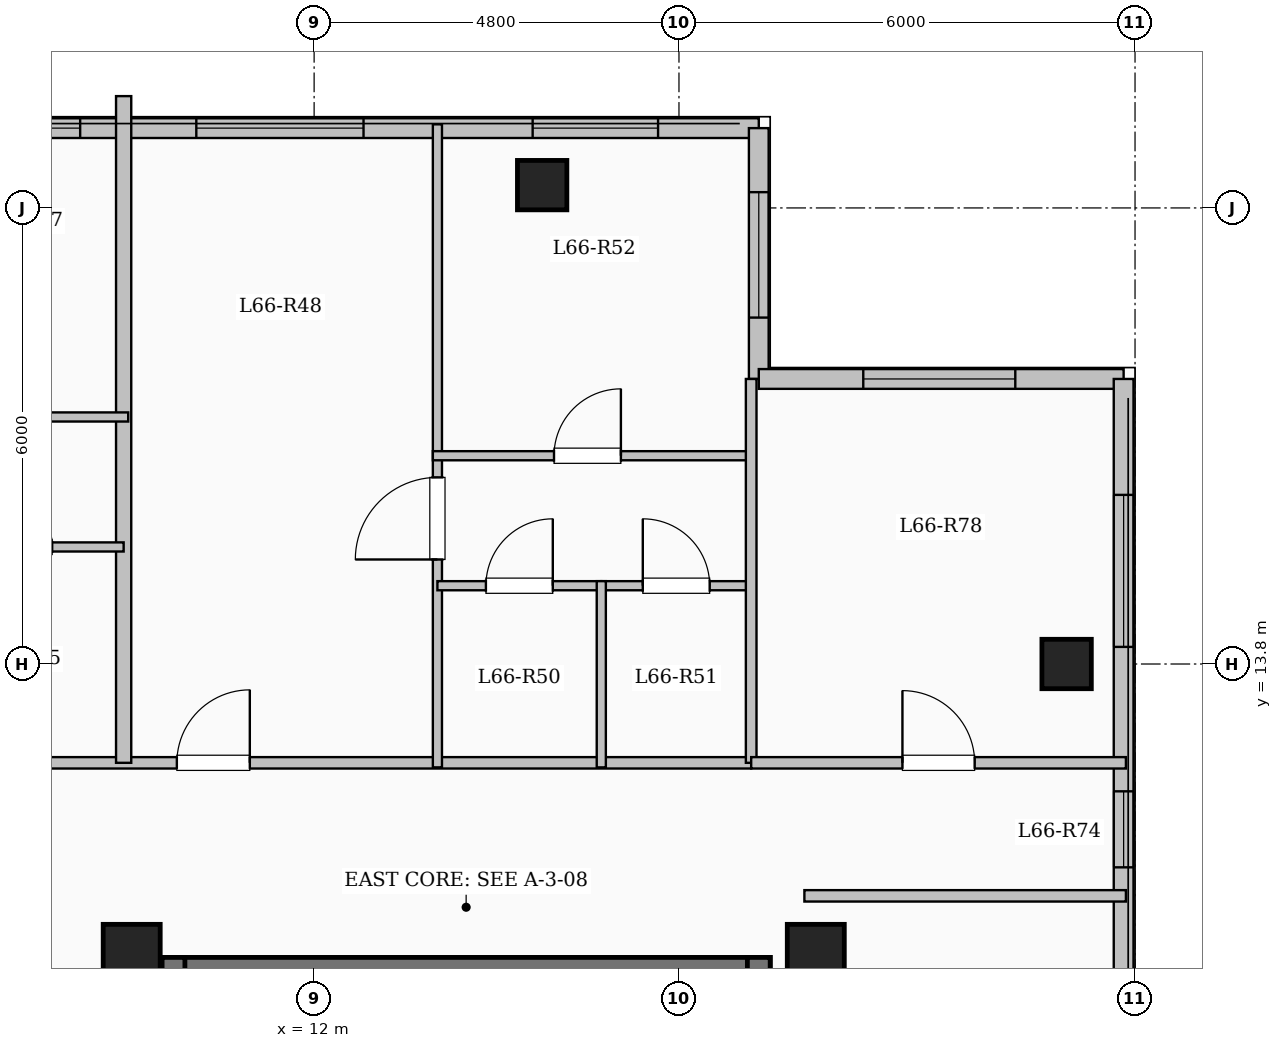
"""IFC4 building model, lengths in metres.
Left out: names, types, materials, properties, quantities, classifications, styles, units other than length and angle.
Written with IfcOpenShell. Run it as: python <this file> out.ifc"""

import sys

from ifc_helpers import new_model, si_unit, direction, frame, frame_2d, origin, origin_2d, place, context, subcontext, project, spatial, rectangle, extrude, element, fill, save


model = new_model("IFC4")
c1 = context("Model", 3, precision=1e-05, world=origin(), true_north=direction((0.0, 1.0)))
c2 = subcontext(c1, "Body", "Model", "MODEL_VIEW")
j1 = project(units=[si_unit("LENGTHUNIT", "METRE"), si_unit("PLANEANGLEUNIT", "RADIAN")], contexts=[c1])
p1 = place(None, origin())
s1 = spatial("IfcSite", under=j1, at=p1, CompositionType="ELEMENT")
p2 = place(p1, origin())
s2 = spatial("IfcBuilding", under=s1, at=p2, CompositionType="ELEMENT")
p3 = place(p2, frame((0.0, 0.0, 244.85)))
s3 = spatial("IfcBuildingStorey", under=s2, at=p3, CompositionType="ELEMENT", Elevation=244.85)
for number, where, z_axis, x_axis in (
    (1, (9.6, 10.0, 0.0), (0.0, 0.0, 1.0), (1.0, 0.0, 0.0)),
    (2, (18.6, 10.0, 0.0), (0.0, 0.0, 1.0), (1.0, 0.0, 0.0)),
):
    element("IfcColumn", number, at=place(p3, frame(where, z_axis=z_axis, x_axis=x_axis)), inside=s3, PredefinedType="COLUMN", context=c2, shape_type="SweptSolid", body=[
        extrude(rectangle(XDim=0.75, YDim=0.75, at=origin_2d()), origin(), (0.0, 0.0, 1.0), 3.35),
    ])
for number, where, z_axis, x_axis in (
    (3, (15.0, 20.1, 0.0), (0.0, 0.0, 1.0), (1.0, 0.0, 0.0)),
    (4, (21.9, 13.8, 0.0), (0.0, 0.0, 1.0), (1.0, 0.0, 0.0)),
):
    element("IfcColumn", number, at=place(p3, frame(where, z_axis=z_axis, x_axis=x_axis)), inside=s3, PredefinedType="COLUMN", context=c2, shape_type="SweptSolid", body=[
        extrude(rectangle(XDim=0.65, YDim=0.65, at=origin_2d()), origin(), (0.0, 0.0, 1.0), 3.35),
    ])
p4 = place(p3, frame((7.35, 20.85, 0.0), z_axis=(0.0, 0.0, 1.0), x_axis=(1.0, 0.0, 0.0)))
e5 = element("IfcWall", 5, at=p4, inside=s3, PredefinedType="SOLIDWALL", context=c2, shape_type="SweptSolid", body=[
    extrude(rectangle(XDim=10.5, YDim=0.26, at=frame_2d((5.25, 0.0))), origin(), (0.0, 0.0, 1.0), 3.1),
])
p5 = place(p4, frame((0.372, 0.0, 0.95)))
e6 = element("IfcOpeningElement", 6, at=p5, cuts=e5, PredefinedType="OPENING", context=c2, shape_type="SweptSolid", body=[
    extrude(rectangle(XDim=1.2, YDim=1.5, at=frame_2d((0.6, 0.75))), frame((0.0, 0.14, 0.0), z_axis=(0.0, -1.0, 0.0), x_axis=(1.0, 0.0, 0.0)), (0.0, 0.0, 1.0), 0.28),
])
p6 = place(p4, frame((3.1, 0.0, 0.9)))
e7 = element("IfcOpeningElement", 7, at=p6, cuts=e5, PredefinedType="OPENING", context=c2, shape_type="SweptSolid", body=[
    extrude(rectangle(XDim=2.2, YDim=1.75, at=frame_2d((1.1, 0.875))), frame((0.0, 0.14, 0.0), z_axis=(0.0, -1.0, 0.0), x_axis=(1.0, 0.0, 0.0)), (0.0, 0.0, 1.0), 0.28),
])
p7 = place(p4, frame((7.525, 0.0, 0.9)))
e8 = element("IfcOpeningElement", 8, at=p7, cuts=e5, PredefinedType="OPENING", context=c2, shape_type="SweptSolid", body=[
    extrude(rectangle(XDim=1.65, YDim=1.6, at=frame_2d((0.825, 0.8))), frame((0.0, 0.14, 0.0), z_axis=(0.0, -1.0, 0.0), x_axis=(1.0, 0.0, 0.0)), (0.0, 0.0, 1.0), 0.28),
])
p8 = place(p3, frame((17.85, 20.85, 0.0), z_axis=(0.0, 0.0, 1.0), x_axis=(0.0, -1.0, 0.0)))
e9 = element("IfcWall", 9, at=p8, inside=s3, PredefinedType="SOLIDWALL", context=c2, shape_type="SweptSolid", body=[
    extrude(rectangle(XDim=3.3, YDim=0.26, at=frame_2d((1.65, 0.0))), origin(), (0.0, 0.0, 1.0), 3.1),
])
p9 = place(p8, frame((0.843, 0.0, 0.9)))
e10 = element("IfcOpeningElement", 10, at=p9, cuts=e9, PredefinedType="OPENING", context=c2, shape_type="SweptSolid", body=[
    extrude(rectangle(XDim=1.65, YDim=1.6, at=frame_2d((0.825, 0.8))), frame((0.0, 0.14, 0.0), z_axis=(0.0, -1.0, 0.0), x_axis=(1.0, 0.0, 0.0)), (0.0, 0.0, 1.0), 0.28),
])
p10 = place(p3, frame((17.85, 17.55, 0.0), z_axis=(0.0, 0.0, 1.0), x_axis=(1.0, 0.0, 0.0)))
e11 = element("IfcWall", 11, at=p10, inside=s3, PredefinedType="SOLIDWALL", context=c2, shape_type="SweptSolid", body=[
    extrude(rectangle(XDim=4.8, YDim=0.26, at=frame_2d((2.4, 0.0))), origin(), (0.0, 0.0, 1.0), 3.1),
])
p11 = place(p10, frame((1.375, 0.0, 0.9)))
e12 = element("IfcOpeningElement", 12, at=p11, cuts=e11, PredefinedType="OPENING", context=c2, shape_type="SweptSolid", body=[
    extrude(rectangle(XDim=2.0, YDim=1.7, at=frame_2d((1.0, 0.85))), frame((0.0, 0.14, 0.0), z_axis=(0.0, -1.0, 0.0), x_axis=(1.0, 0.0, 0.0)), (0.0, 0.0, 1.0), 0.28),
])
p12 = place(p3, frame((22.65, 17.55, 0.0), z_axis=(0.0, 0.0, 1.0), x_axis=(0.0, -1.0, 0.0)))
e13 = element("IfcWall", 13, at=p12, inside=s3, PredefinedType="SOLIDWALL", context=c2, shape_type="SweptSolid", body=[
    extrude(rectangle(XDim=35.1, YDim=0.26, at=frame_2d((17.55, 0.0))), origin(), (0.0, 0.0, 1.0), 3.1),
])
p13 = place(p12, frame((1.525, 0.0, 0.9)))
e14 = element("IfcOpeningElement", 14, at=p13, cuts=e13, PredefinedType="OPENING", context=c2, shape_type="SweptSolid", body=[
    extrude(rectangle(XDim=2.0, YDim=1.7, at=frame_2d((1.0, 0.85))), frame((0.0, 0.14, 0.0), z_axis=(0.0, -1.0, 0.0), x_axis=(1.0, 0.0, 0.0)), (0.0, 0.0, 1.0), 0.28),
])
p14 = place(p12, frame((5.425, 0.0, 0.95)))
e15 = element("IfcOpeningElement", 15, at=p14, cuts=e13, PredefinedType="OPENING", context=c2, shape_type="SweptSolid", body=[
    extrude(rectangle(XDim=1.0, YDim=1.5, at=frame_2d((0.5, 0.75))), frame((0.0, 0.14, 0.0), z_axis=(0.0, -1.0, 0.0), x_axis=(1.0, 0.0, 0.0)), (0.0, 0.0, 1.0), 0.28),
])
p15 = place(p12, frame((8.675, 0.0, 0.9)))
e16 = element("IfcOpeningElement", 16, at=p15, cuts=e13, PredefinedType="OPENING", context=c2, shape_type="SweptSolid", body=[
    extrude(rectangle(XDim=2.0, YDim=1.7, at=frame_2d((1.0, 0.85))), frame((0.0, 0.14, 0.0), z_axis=(0.0, -1.0, 0.0), x_axis=(1.0, 0.0, 0.0)), (0.0, 0.0, 1.0), 0.28),
])
p16 = place(p12, frame((13.5, 0.0, 0.9)))
e17 = element("IfcOpeningElement", 17, at=p16, cuts=e13, PredefinedType="OPENING", context=c2, shape_type="SweptSolid", body=[
    extrude(rectangle(XDim=1.65, YDim=1.6, at=frame_2d((0.825, 0.8))), frame((0.0, 0.14, 0.0), z_axis=(0.0, -1.0, 0.0), x_axis=(1.0, 0.0, 0.0)), (0.0, 0.0, 1.0), 0.28),
])
p17 = place(p12, frame((19.35, 0.0, 0.9)))
e18 = element("IfcOpeningElement", 18, at=p17, cuts=e13, PredefinedType="OPENING", context=c2, shape_type="SweptSolid", body=[
    extrude(rectangle(XDim=2.2, YDim=1.75, at=frame_2d((1.1, 0.875))), frame((0.0, 0.14, 0.0), z_axis=(0.0, -1.0, 0.0), x_axis=(1.0, 0.0, 0.0)), (0.0, 0.0, 1.0), 0.28),
])
p18 = place(p12, frame((25.275, 0.0, 0.95)))
e19 = element("IfcOpeningElement", 19, at=p18, cuts=e13, PredefinedType="OPENING", context=c2, shape_type="SweptSolid", body=[
    extrude(rectangle(XDim=1.2, YDim=1.5, at=frame_2d((0.6, 0.75))), frame((0.0, 0.14, 0.0), z_axis=(0.0, -1.0, 0.0), x_axis=(1.0, 0.0, 0.0)), (0.0, 0.0, 1.0), 0.28),
])
p19 = place(p12, frame((29.925, 0.0, 0.9)))
e20 = element("IfcOpeningElement", 20, at=p19, cuts=e13, PredefinedType="OPENING", context=c2, shape_type="SweptSolid", body=[
    extrude(rectangle(XDim=2.2, YDim=1.75, at=frame_2d((1.1, 0.875))), frame((0.0, 0.14, 0.0), z_axis=(0.0, -1.0, 0.0), x_axis=(1.0, 0.0, 0.0)), (0.0, 0.0, 1.0), 0.28),
])
p20 = place(p3, frame((10.0, 9.79, 0.0), z_axis=(0.0, 0.0, 1.0), x_axis=(1.0, 0.0, 0.0)))
e21 = element("IfcWall", 21, at=p20, inside=s3, PredefinedType="SHEAR", context=c2, shape_type="SweptSolid", body=[
    extrude(rectangle(XDim=8.0, YDim=0.3, at=frame_2d((4.0, 0.0))), origin(), (0.0, 0.0, 1.0), 3.35),
])
for number, where, z_axis, x_axis in (
    (22, (10.15, 6.35, 0.0), (0.0, 0.0, 1.0), (0.0, 1.0, 0.0)),
    (23, (17.85, 6.35, 0.0), (0.0, 0.0, 1.0), (0.0, 1.0, 0.0)),
):
    element("IfcWall", number, at=place(p3, frame(where, z_axis=z_axis, x_axis=x_axis)), inside=s3, PredefinedType="SHEAR", context=c2, shape_type="SweptSolid", body=[
        extrude(rectangle(XDim=3.59, YDim=0.3, at=frame_2d((1.795, 0.0))), origin(), (0.0, 0.0, 1.0), 3.35),
    ])
p21 = place(p3, frame((3.85, 12.5, 0.0), z_axis=(0.0, 0.0, 1.0), x_axis=(1.0, 0.0, 0.0)))
e24 = element("IfcWall", 24, at=p21, inside=s3, PredefinedType="PARTITIONING", context=c2, shape_type="SweptSolid", body=[
    extrude(rectangle(XDim=13.9, YDim=0.15, at=frame_2d((6.95, 0.0))), origin(), (0.0, 0.0, 1.0), 3.1),
])
p22 = place(p21, frame((0.7, 0.0, 0.0)))
e25 = element("IfcOpeningElement", 25, at=p22, cuts=e24, PredefinedType="OPENING", context=c2, shape_type="SweptSolid", body=[
    extrude(rectangle(XDim=0.96, YDim=2.15, at=frame_2d((0.48, 1.075))), frame((0.0, 0.085, 0.0), z_axis=(0.0, -1.0, 0.0), x_axis=(1.0, 0.0, 0.0)), (0.0, 0.0, 1.0), 0.17),
])
p23 = place(p21, frame((6.344, 0.0, 0.0)))
e26 = element("IfcOpeningElement", 26, at=p23, cuts=e24, PredefinedType="OPENING", context=c2, shape_type="SweptSolid", body=[
    extrude(rectangle(XDim=0.96, YDim=2.15, at=frame_2d((0.48, 1.075))), frame((0.0, 0.085, 0.0), z_axis=(0.0, -1.0, 0.0), x_axis=(1.0, 0.0, 0.0)), (0.0, 0.0, 1.0), 0.17),
])
p24 = place(p3, frame((9.494, 12.5, 0.0), z_axis=(0.0, 0.0, 1.0), x_axis=(0.0, 1.0, 0.0)))
e27 = element("IfcWall", 27, at=p24, inside=s3, PredefinedType="SOLIDWALL", context=c2, shape_type="SweptSolid", body=[
    extrude(rectangle(XDim=8.771, YDim=0.2, at=frame_2d((4.385, 0.0))), origin(), (0.0, 0.0, 1.0), 3.1),
])
p25 = place(p3, frame((6.734, 15.34, 0.0), z_axis=(0.0, 0.0, 1.0), x_axis=(1.0, 0.0, 0.0)))
e28 = element("IfcWall", 28, at=p25, inside=s3, PredefinedType="PARTITIONING", context=c2, shape_type="SweptSolid", body=[
    extrude(rectangle(XDim=2.76, YDim=0.12, at=frame_2d((1.38, 0.0))), origin(), (0.0, 0.0, 1.0), 2.785),
])
p26 = place(p25, frame((0.94, 0.0, 0.0)))
e29 = element("IfcOpeningElement", 29, at=p26, cuts=e28, PredefinedType="OPENING", context=c2, shape_type="SweptSolid", body=[
    extrude(rectangle(XDim=0.88, YDim=2.1, at=frame_2d((0.44, 1.05))), frame((0.0, 0.07, 0.0), z_axis=(0.0, -1.0, 0.0), x_axis=(1.0, 0.0, 0.0)), (0.0, 0.0, 1.0), 0.14),
])
p27 = place(p3, frame((4.08, 17.05, 0.0), z_axis=(0.0, 0.0, 1.0), x_axis=(1.0, 0.0, 0.0)))
e30 = element("IfcWall", 30, at=p27, inside=s3, PredefinedType="PARTITIONING", context=c2, shape_type="SweptSolid", body=[
    extrude(rectangle(XDim=5.474, YDim=0.12, at=frame_2d((2.737, 0.0))), origin(), (0.0, 0.0, 1.0), 2.785),
])
p28 = place(p27, frame((0.883, 0.0, 0.0)))
e31 = element("IfcOpeningElement", 31, at=p28, cuts=e30, PredefinedType="OPENING", context=c2, shape_type="SweptSolid", body=[
    extrude(rectangle(XDim=0.88, YDim=2.1, at=frame_2d((0.44, 1.05))), frame((0.0, 0.07, 0.0), z_axis=(0.0, -1.0, 0.0), x_axis=(1.0, 0.0, 0.0)), (0.0, 0.0, 1.0), 0.14),
])
p29 = place(p27, frame((3.53, 0.0, 0.0)))
e32 = element("IfcOpeningElement", 32, at=p29, cuts=e30, PredefinedType="OPENING", context=c2, shape_type="SweptSolid", body=[
    extrude(rectangle(XDim=0.88, YDim=2.1, at=frame_2d((0.44, 1.05))), frame((0.0, 0.07, 0.0), z_axis=(0.0, -1.0, 0.0), x_axis=(1.0, 0.0, 0.0)), (0.0, 0.0, 1.0), 0.14),
])
p30 = place(p3, frame((13.622, 12.44, 0.0), z_axis=(0.0, 0.0, 1.0), x_axis=(0.0, 1.0, 0.0)))
e33 = element("IfcWall", 33, at=p30, inside=s3, PredefinedType="PARTITIONING", context=c2, shape_type="SweptSolid", body=[
    extrude(rectangle(XDim=8.46, YDim=0.12, at=frame_2d((4.23, 0.0))), origin(), (0.0, 0.0, 1.0), 3.1),
])
p31 = place(p30, frame((2.735, 0.0, 0.0)))
e34 = element("IfcOpeningElement", 34, at=p31, cuts=e33, PredefinedType="OPENING", context=c2, shape_type="SweptSolid", body=[
    extrude(rectangle(XDim=1.08, YDim=2.15, at=frame_2d((0.54, 1.075))), frame((0.0, 0.07, 0.0), z_axis=(0.0, -1.0, 0.0), x_axis=(1.0, 0.0, 0.0)), (0.0, 0.0, 1.0), 0.14),
])
p32 = place(p3, frame((13.622, 14.83, 0.0), z_axis=(0.0, 0.0, 1.0), x_axis=(1.0, 0.0, 0.0)))
e35 = element("IfcWall", 35, at=p32, inside=s3, PredefinedType="PARTITIONING", context=c2, shape_type="SweptSolid", body=[
    extrude(rectangle(XDim=2.156, YDim=0.12, at=frame_2d((1.078, 0.0))), origin(), (0.0, 0.0, 1.0), 3.1),
])
p33 = place(p32, frame((0.638, 0.0, 0.0)))
e36 = element("IfcOpeningElement", 36, at=p33, cuts=e35, PredefinedType="OPENING", context=c2, shape_type="SweptSolid", body=[
    extrude(rectangle(XDim=0.88, YDim=2.1, at=frame_2d((0.44, 1.05))), frame((0.0, 0.07, 0.0), z_axis=(0.0, -1.0, 0.0), x_axis=(1.0, 0.0, 0.0)), (0.0, 0.0, 1.0), 0.14),
])
p34 = place(p3, frame((15.778, 14.83, 0.0), z_axis=(0.0, 0.0, 1.0), x_axis=(1.0, 0.0, 0.0)))
e37 = element("IfcWall", 37, at=p34, inside=s3, PredefinedType="PARTITIONING", context=c2, shape_type="SweptSolid", body=[
    extrude(rectangle(XDim=1.972, YDim=0.12, at=frame_2d((0.986, 0.0))), origin(), (0.0, 0.0, 1.0), 3.1),
])
p35 = place(p34, frame((0.546, 0.0, 0.0)))
e38 = element("IfcOpeningElement", 38, at=p35, cuts=e37, PredefinedType="OPENING", context=c2, shape_type="SweptSolid", body=[
    extrude(rectangle(XDim=0.88, YDim=2.1, at=frame_2d((0.44, 1.05))), frame((0.0, 0.07, 0.0), z_axis=(0.0, -1.0, 0.0), x_axis=(1.0, 0.0, 0.0)), (0.0, 0.0, 1.0), 0.14),
])
p36 = place(p3, frame((13.562, 16.54, 0.0), z_axis=(0.0, 0.0, 1.0), x_axis=(1.0, 0.0, 0.0)))
e39 = element("IfcWall", 39, at=p36, inside=s3, PredefinedType="PARTITIONING", context=c2, shape_type="SweptSolid", body=[
    extrude(rectangle(XDim=4.248, YDim=0.12, at=frame_2d((2.124, 0.0))), origin(), (0.0, 0.0, 1.0), 3.1),
])
p37 = place(p36, frame((1.594, 0.0, 0.0)))
e40 = element("IfcOpeningElement", 40, at=p37, cuts=e39, PredefinedType="OPENING", context=c2, shape_type="SweptSolid", body=[
    extrude(rectangle(XDim=0.88, YDim=2.1, at=frame_2d((0.44, 1.05))), frame((0.0, 0.07, 0.0), z_axis=(0.0, -1.0, 0.0), x_axis=(1.0, 0.0, 0.0)), (0.0, 0.0, 1.0), 0.14),
])
p38 = place(p3, frame((15.778, 12.44, 0.0), z_axis=(0.0, 0.0, 1.0), x_axis=(0.0, 1.0, 0.0)))
e41 = element("IfcWall", 41, at=p38, inside=s3, PredefinedType="PARTITIONING", context=c2, shape_type="SweptSolid", body=[
    extrude(rectangle(XDim=2.45, YDim=0.12, at=frame_2d((1.225, 0.0))), origin(), (0.0, 0.0, 1.0), 3.1),
])
p39 = place(p3, frame((18.45, 10.75, 0.0), z_axis=(0.0, 0.0, 1.0), x_axis=(1.0, 0.0, 0.0)))
e42 = element("IfcWall", 42, at=p39, inside=s3, PredefinedType="PARTITIONING", context=c2, shape_type="SweptSolid", body=[
    extrude(rectangle(XDim=4.23, YDim=0.15, at=frame_2d((2.115, 0.0))), origin(), (0.0, 0.0, 1.0), 3.1),
])
p40 = place(p3, frame((17.75, 12.5, 0.0), z_axis=(0.0, 0.0, 1.0), x_axis=(0.0, 1.0, 0.0)))
e43 = element("IfcWall", 43, at=p40, inside=s3, PredefinedType="PARTITIONING", context=c2, shape_type="SweptSolid", body=[
    extrude(rectangle(XDim=5.05, YDim=0.14, at=frame_2d((2.525, 0.0))), origin(), (0.0, 0.0, 1.0), 3.1),
])
p41 = place(p3, frame((17.75, 12.5, 0.0), z_axis=(0.0, 0.0, 1.0), x_axis=(1.0, 0.0, 0.0)))
e44 = element("IfcWall", 44, at=p41, inside=s3, PredefinedType="PARTITIONING", context=c2, shape_type="SweptSolid", body=[
    extrude(rectangle(XDim=4.93, YDim=0.15, at=frame_2d((2.465, 0.0))), origin(), (0.0, 0.0, 1.0), 3.1),
])
p42 = place(p41, frame((1.99, 0.0, 0.0)))
e45 = element("IfcOpeningElement", 45, at=p42, cuts=e44, PredefinedType="OPENING", context=c2, shape_type="SweptSolid", body=[
    extrude(rectangle(XDim=0.95, YDim=2.15, at=frame_2d((0.475, 1.075))), frame((0.0, 0.085, 0.0), z_axis=(0.0, -1.0, 0.0), x_axis=(1.0, 0.0, 0.0)), (0.0, 0.0, 1.0), 0.17),
])
p43 = place(p5, origin())
e46 = element("IfcWindow", 46, at=p43, inside=s3, PartitioningType="SINGLE_PANEL", PredefinedType="WINDOW", context=c2, shape_type="SweptSolid", body=[
    extrude(rectangle(XDim=1.2, YDim=1.5, at=frame_2d((0.6, 0.75))), frame((0.0, 0.03, 0.0), z_axis=(0.0, -1.0, 0.0), x_axis=(1.0, 0.0, 0.0)), (0.0, 0.0, 1.0), 0.06),
])
fill(e6, e46)
p44 = place(p6, origin())
e47 = element("IfcWindow", 47, at=p44, inside=s3, PartitioningType="SINGLE_PANEL", PredefinedType="WINDOW", context=c2, shape_type="SweptSolid", body=[
    extrude(rectangle(XDim=2.2, YDim=1.75, at=frame_2d((1.1, 0.875))), frame((0.0, 0.03, 0.0), z_axis=(0.0, -1.0, 0.0), x_axis=(1.0, 0.0, 0.0)), (0.0, 0.0, 1.0), 0.06),
])
fill(e7, e47)
p45 = place(p7, origin())
e48 = element("IfcWindow", 48, at=p45, inside=s3, PartitioningType="SINGLE_PANEL", PredefinedType="WINDOW", context=c2, shape_type="SweptSolid", body=[
    extrude(rectangle(XDim=1.65, YDim=1.6, at=frame_2d((0.825, 0.8))), frame((0.0, 0.03, 0.0), z_axis=(0.0, -1.0, 0.0), x_axis=(1.0, 0.0, 0.0)), (0.0, 0.0, 1.0), 0.06),
])
fill(e8, e48)
p46 = place(p9, origin())
e49 = element("IfcWindow", 49, at=p46, inside=s3, PartitioningType="SINGLE_PANEL", PredefinedType="WINDOW", context=c2, shape_type="SweptSolid", body=[
    extrude(rectangle(XDim=1.65, YDim=1.6, at=frame_2d((0.825, 0.8))), frame((0.0, 0.03, 0.0), z_axis=(0.0, -1.0, 0.0), x_axis=(1.0, 0.0, 0.0)), (0.0, 0.0, 1.0), 0.06),
])
fill(e10, e49)
p47 = place(p11, origin())
e50 = element("IfcWindow", 50, at=p47, inside=s3, PartitioningType="SINGLE_PANEL", PredefinedType="WINDOW", context=c2, shape_type="SweptSolid", body=[
    extrude(rectangle(XDim=2.0, YDim=1.7, at=frame_2d((1.0, 0.85))), frame((0.0, 0.03, 0.0), z_axis=(0.0, -1.0, 0.0), x_axis=(1.0, 0.0, 0.0)), (0.0, 0.0, 1.0), 0.06),
])
fill(e12, e50)
p48 = place(p13, origin())
e51 = element("IfcWindow", 51, at=p48, inside=s3, PartitioningType="SINGLE_PANEL", PredefinedType="WINDOW", context=c2, shape_type="SweptSolid", body=[
    extrude(rectangle(XDim=2.0, YDim=1.7, at=frame_2d((1.0, 0.85))), frame((0.0, 0.03, 0.0), z_axis=(0.0, -1.0, 0.0), x_axis=(1.0, 0.0, 0.0)), (0.0, 0.0, 1.0), 0.06),
])
fill(e14, e51)
p49 = place(p14, origin())
e52 = element("IfcWindow", 52, at=p49, inside=s3, PartitioningType="SINGLE_PANEL", PredefinedType="WINDOW", context=c2, shape_type="SweptSolid", body=[
    extrude(rectangle(XDim=1.0, YDim=1.5, at=frame_2d((0.5, 0.75))), frame((0.0, 0.03, 0.0), z_axis=(0.0, -1.0, 0.0), x_axis=(1.0, 0.0, 0.0)), (0.0, 0.0, 1.0), 0.06),
])
fill(e15, e52)
p50 = place(p23, origin())
e53 = element("IfcDoor", 53, at=p50, inside=s3, OperationType="SINGLE_SWING_RIGHT", PredefinedType="DOOR", context=c2, shape_type="SweptSolid", body=[
    extrude(rectangle(XDim=0.96, YDim=2.15, at=frame_2d((0.48, 1.075))), frame((0.0, 0.025, 0.0), z_axis=(0.0, -1.0, 0.0), x_axis=(1.0, 0.0, 0.0)), (0.0, 0.0, 1.0), 0.05),
])
fill(e26, e53)
p51 = place(p31, origin())
e54 = element("IfcDoor", 54, at=p51, inside=s3, OperationType="SINGLE_SWING_LEFT", PredefinedType="DOOR", context=c2, shape_type="SweptSolid", body=[
    extrude(rectangle(XDim=1.08, YDim=2.15, at=frame_2d((0.54, 1.075))), frame((0.0, 0.025, 0.0), z_axis=(0.0, -1.0, 0.0), x_axis=(1.0, 0.0, 0.0)), (0.0, 0.0, 1.0), 0.05),
])
fill(e34, e54)
p52 = place(p33, origin())
e55 = element("IfcDoor", 55, at=p52, inside=s3, OperationType="SINGLE_SWING_RIGHT", PredefinedType="DOOR", context=c2, shape_type="SweptSolid", body=[
    extrude(rectangle(XDim=0.88, YDim=2.1, at=frame_2d((0.44, 1.05))), frame((0.0, 0.025, 0.0), z_axis=(0.0, -1.0, 0.0), x_axis=(1.0, 0.0, 0.0)), (0.0, 0.0, 1.0), 0.05),
])
fill(e36, e55)
p53 = place(p35, origin())
e56 = element("IfcDoor", 56, at=p53, inside=s3, OperationType="SINGLE_SWING_LEFT", PredefinedType="DOOR", context=c2, shape_type="SweptSolid", body=[
    extrude(rectangle(XDim=0.88, YDim=2.1, at=frame_2d((0.44, 1.05))), frame((0.0, 0.025, 0.0), z_axis=(0.0, -1.0, 0.0), x_axis=(1.0, 0.0, 0.0)), (0.0, 0.0, 1.0), 0.05),
])
fill(e38, e56)
p54 = place(p37, origin())
e57 = element("IfcDoor", 57, at=p54, inside=s3, OperationType="SINGLE_SWING_RIGHT", PredefinedType="DOOR", context=c2, shape_type="SweptSolid", body=[
    extrude(rectangle(XDim=0.88, YDim=2.1, at=frame_2d((0.44, 1.05))), frame((0.0, 0.025, 0.0), z_axis=(0.0, -1.0, 0.0), x_axis=(1.0, 0.0, 0.0)), (0.0, 0.0, 1.0), 0.05),
])
fill(e40, e57)
p55 = place(p42, origin())
e58 = element("IfcDoor", 58, at=p55, inside=s3, OperationType="SINGLE_SWING_LEFT", PredefinedType="DOOR", context=c2, shape_type="SweptSolid", body=[
    extrude(rectangle(XDim=0.95, YDim=2.15, at=frame_2d((0.475, 1.075))), frame((0.0, 0.025, 0.0), z_axis=(0.0, -1.0, 0.0), x_axis=(1.0, 0.0, 0.0)), (0.0, 0.0, 1.0), 0.05),
])
fill(e45, e58)
save(model, sys.argv[1])
